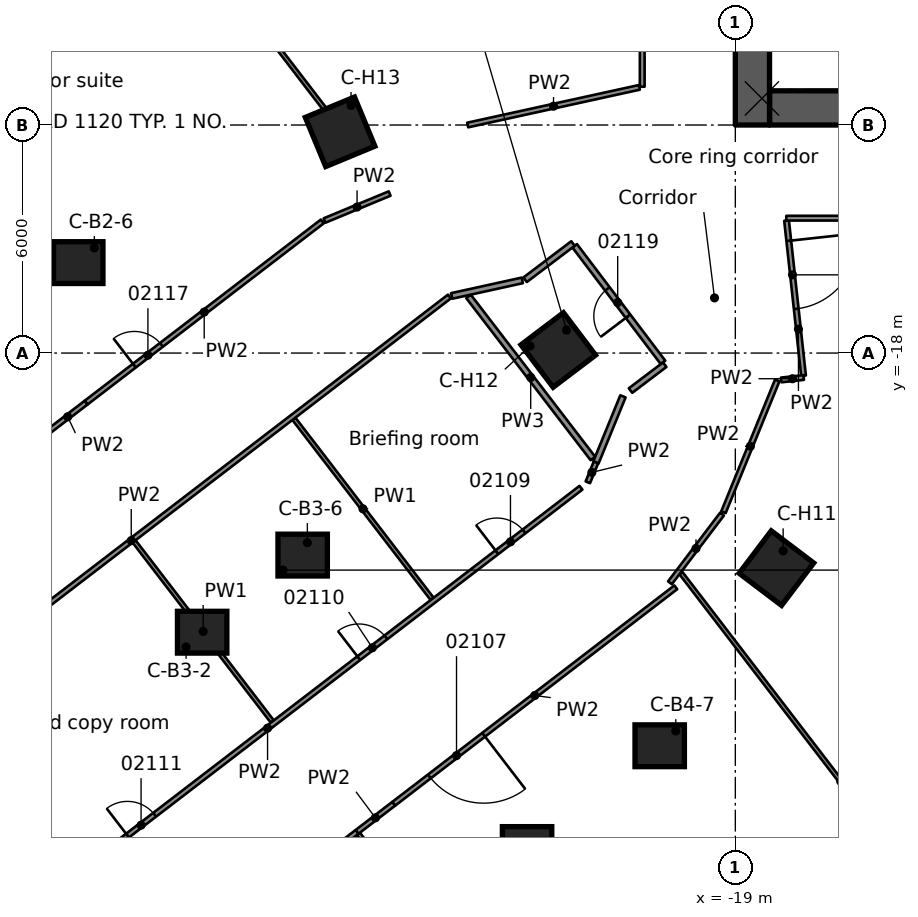
"""IFC4 building model, lengths in metres.
Left out: names, types, materials, properties, quantities, classifications, styles, units other than length and angle.
Written with IfcOpenShell. Run it as: python <this file> out.ifc"""

import sys

from ifc_helpers import new_model, si_unit, direction, frame, frame_2d, origin, origin_2d, place, context, subcontext, project, spatial, rectangle, extrude, element, fill, save


model = new_model("IFC4")
c1 = context("Model", 3, precision=1e-05, world=origin(), true_north=direction((0.0, 1.0)))
c2 = subcontext(c1, "Body", "Model", "MODEL_VIEW")
j1 = project(units=[si_unit("LENGTHUNIT", "METRE"), si_unit("PLANEANGLEUNIT", "RADIAN")], contexts=[c1])
p1 = place(None, origin())
s1 = spatial("IfcSite", under=j1, at=p1, CompositionType="ELEMENT")
p2 = place(p1, origin())
s2 = spatial("IfcBuilding", under=s1, at=p2, CompositionType="ELEMENT")
p3 = place(p2, frame((0.0, 0.0, 10.5)))
s3 = spatial("IfcBuildingStorey", under=s2, at=p3, CompositionType="ELEMENT", Elevation=10.5)
p4 = place(p3, frame((-18.1, -11.55, 0.0), z_axis=(0.0, 0.0, 1.0), x_axis=(1.0, 0.0, 0.0)))
e1 = element("IfcWall", 1, at=p4, inside=s3, PredefinedType="SHEAR", context=c2, shape_type="SweptSolid", body=[
    extrude(rectangle(XDim=9.2, YDim=0.9, at=frame_2d((4.6, 0.0))), origin(), (0.0, 0.0, 1.0), 5.0),
])
p5 = place(p4, frame((5.1, 0.0, 0.0)))
e2 = element("IfcOpeningElement", 2, at=p5, cuts=e1, PredefinedType="OPENING", context=c2, shape_type="SweptSolid", body=[
    extrude(rectangle(XDim=1.1, YDim=2.1, at=frame_2d((0.55, 1.05))), frame((0.0, 0.46, 0.0), z_axis=(0.0, -1.0, 0.0), x_axis=(1.0, 0.0, 0.0)), (0.0, 0.0, 1.0), 0.92),
])
p6 = place(p4, frame((7.53, 0.0, 0.0)))
e3 = element("IfcOpeningElement", 3, at=p6, cuts=e1, PredefinedType="OPENING", context=c2, shape_type="SweptSolid", body=[
    extrude(rectangle(XDim=0.9, YDim=2.1, at=frame_2d((0.45, 1.05))), frame((0.0, 0.46, 0.0), z_axis=(0.0, -1.0, 0.0), x_axis=(1.0, 0.0, 0.0)), (0.0, 0.0, 1.0), 0.92),
])
p7 = place(p3, frame((-18.55, -12.0, 0.0), z_axis=(0.0, 0.0, 1.0), x_axis=(0.0, 1.0, 0.0)))
e4 = element("IfcWall", 4, at=p7, inside=s3, PredefinedType="SHEAR", context=c2, shape_type="SweptSolid", body=[
    extrude(rectangle(XDim=24.0, YDim=0.9, at=frame_2d((12.0, 0.0))), origin(), (0.0, 0.0, 1.0), 5.0),
])
p8 = place(p7, frame((10.1, 0.0, 0.0)))
e5 = element("IfcOpeningElement", 5, at=p8, cuts=e4, PredefinedType="OPENING", context=c2, shape_type="SweptSolid", body=[
    extrude(rectangle(XDim=1.8, YDim=2.1, at=frame_2d((0.9, 1.05))), frame((0.0, 0.46, 0.0), z_axis=(0.0, -1.0, 0.0), x_axis=(1.0, 0.0, 0.0)), (0.0, 0.0, 1.0), 0.92),
])
p9 = place(p3, frame((-39.016, -8.771, -1.0), z_axis=(0.0, 0.0, 1.0), x_axis=(0.707106781187, 0.707106781187, 0.0)))
e6 = element("IfcColumn", 6, at=p9, inside=s3, PredefinedType="COLUMN", context=c2, shape_type="SweptSolid", body=[
    extrude(rectangle(XDim=3.4, YDim=3.4, at=origin_2d()), origin(), (0.0, 0.0, 1.0), 1.0),
])
for number, where, z_axis, x_axis in (
    (7, (-38.935, -17.649, -1.0), (0.0, 0.0, 1.0), (0.707, 0.707, 0.0)),
    (8, (-36.29, -15.62, -1.0), (0.0, 0.0, 1.0), (0.707, 0.707, 0.0)),
    (9, (-33.03, -25.345, -1.0), (0.0, 0.0, 1.0), (0.707, 0.707, 0.0)),
    (10, (-30.385, -23.316, -1.0), (0.0, 0.0, 1.0), (0.707, 0.707, 0.0)),
    (11, (-27.125, -33.04, -1.0), (0.0, 0.0, 1.0), (0.707, 0.707, 0.0)),
    (12, (-24.48, -31.011, -1.0), (0.0, 0.0, 1.0), (0.707, 0.707, 0.0)),
):
    element("IfcColumn", number, at=place(p3, frame(where, z_axis=z_axis, x_axis=x_axis)), inside=s3, PredefinedType="COLUMN", context=c2, shape_type="SweptSolid", body=[
        extrude(rectangle(XDim=3.25, YDim=3.25, at=origin_2d()), origin(), (0.0, 0.0, 1.0), 1.0),
    ])
for number, where, z_axis, x_axis in (
    (13, (-20.99, -28.333, -1.0), (0.0, 0.0, 1.0), (0.707, 0.707, 0.0)),
    (14, (-17.919, -23.659, -1.0), (0.0, 0.0, 1.0), (0.707, 0.707, 0.0)),
    (15, (-23.659, -17.919, -1.0), (0.0, 0.0, 1.0), (0.707, 0.707, 0.0)),
    (16, (-29.4, -12.178, -1.0), (0.0, 0.0, 1.0), (0.707, 0.707, 0.0)),
):
    element("IfcColumn", number, at=place(p3, frame(where, z_axis=z_axis, x_axis=x_axis)), inside=s3, PredefinedType="COLUMN", context=c2, shape_type="SweptSolid", body=[
        extrude(rectangle(XDim=3.4, YDim=3.4, at=origin_2d()), origin(), (0.0, 0.0, 1.0), 1.0),
    ])
for number, where, z_axis, x_axis in (
    (17, (-36.29, -15.62, 0.0), (0.0, 0.0, 1.0), (1.0, 0.0, 0.0)),
    (18, (-33.03, -25.345, 0.0), (0.0, 0.0, 1.0), (1.0, 0.0, 0.0)),
    (19, (-30.385, -23.316, 0.0), (0.0, 0.0, 1.0), (1.0, 0.0, 0.0)),
    (20, (-24.48, -31.011, 0.0), (0.0, 0.0, 1.0), (1.0, 0.0, 0.0)),
    (21, (-20.99, -28.333, 0.0), (0.0, 0.0, 1.0), (1.0, 0.0, 0.0)),
):
    element("IfcColumn", number, at=place(p3, frame(where, z_axis=z_axis, x_axis=x_axis)), inside=s3, PredefinedType="COLUMN", context=c2, shape_type="SweptSolid", body=[
        extrude(rectangle(XDim=1.3, YDim=1.1, at=origin_2d()), origin(), (0.0, 0.0, 1.0), 5.0),
    ])
for number, where, z_axis, x_axis in (
    (22, (-17.919, -23.659, 0.0), (0.0, 0.0, 1.0), (-0.604, -0.797, 0.0)),
    (23, (-23.659, -17.919, 0.0), (0.0, 0.0, 1.0), (-0.797, -0.604, 0.0)),
    (24, (-29.4, -12.178, 0.0), (0.0, 0.0, 1.0), (-0.924, -0.383, 0.0)),
):
    element("IfcColumn", number, at=place(p3, frame(where, z_axis=z_axis, x_axis=x_axis)), inside=s3, PredefinedType="COLUMN", context=c2, shape_type="SweptSolid", body=[
        extrude(rectangle(XDim=1.4, YDim=1.4, at=origin_2d()), origin(), (0.0, 0.0, 1.0), 5.0),
    ])
p10 = place(p3, frame((-17.652, -14.513, 0.0), z_axis=(0.0, 0.0, 1.0), x_axis=(0.108833050521, -0.994060042007, 0.0)))
e25 = element("IfcWall", 25, at=p10, inside=s3, PredefinedType="PARTITIONING", context=c2, shape_type="SweptSolid", body=[
    extrude(rectangle(XDim=4.107, YDim=0.125, at=frame_2d((2.054, 0.0))), origin(), (0.0, 0.0, 1.0), 4.58),
])
p11 = place(p10, frame((0.538, 0.0, 0.0)))
e26 = element("IfcOpeningElement", 26, at=p11, cuts=e25, PredefinedType="OPENING", context=c2, shape_type="SweptSolid", body=[
    extrude(rectangle(XDim=1.8, YDim=2.1, at=frame_2d((0.9, 1.05))), frame((0.0, 0.073, 0.0), z_axis=(0.0, -1.0, 0.0), x_axis=(1.0, 0.0, 0.0)), (0.0, 0.0, 1.0), 0.145),
])
p12 = place(p3, frame((-20.903, -18.246, 0.0), z_axis=(0.0, 0.0, 1.0), x_axis=(-0.603799066409, 0.797136555054, 0.0)))
e27 = element("IfcWall", 27, at=p12, inside=s3, PredefinedType="PARTITIONING", context=c2, shape_type="SweptSolid", body=[
    extrude(rectangle(XDim=3.849, YDim=0.15, at=frame_2d((1.924, 0.0))), origin(), (0.0, 0.0, 1.0), 4.58),
])
p13 = place(p12, frame((1.525, 0.0, 0.0)))
e28 = element("IfcOpeningElement", 28, at=p13, cuts=e27, PredefinedType="OPENING", context=c2, shape_type="SweptSolid", body=[
    extrude(rectangle(XDim=0.9, YDim=2.1, at=frame_2d((0.45, 1.05))), frame((0.0, 0.085, 0.0), z_axis=(0.0, -1.0, 0.0), x_axis=(1.0, 0.0, 0.0)), (0.0, 0.0, 1.0), 0.17),
])
p14 = place(p3, frame((-34.822, -22.955, 0.0), z_axis=(0.0, 0.0, 1.0), x_axis=(0.608823570319, -0.79330565372, 0.0)))
e29 = element("IfcWall", 29, at=p14, inside=s3, PredefinedType="PARTITIONING", context=c2, shape_type="SweptSolid", body=[
    extrude(rectangle(XDim=5.974, YDim=0.1, at=frame_2d((2.987, 0.0))), origin(), (0.0, 0.0, 1.0), 4.58),
])
p15 = place(p3, frame((-28.917, -30.652, 0.0), z_axis=(0.0, 0.0, 1.0), x_axis=(0.608788953199, -0.793332219478, 0.0)))
e30 = element("IfcWall", 30, at=p15, inside=s3, PredefinedType="PARTITIONING", context=c2, shape_type="SweptSolid", body=[
    extrude(rectangle(XDim=13.535, YDim=0.1, at=frame_2d((6.768, 0.0))), origin(), (0.0, 0.0, 1.0), 4.58),
])
p16 = place(p3, frame((-30.617, -19.729, 0.0), z_axis=(0.0, 0.0, 1.0), x_axis=(0.608902533452, -0.793245047104, 0.0)))
e31 = element("IfcWall", 31, at=p16, inside=s3, PredefinedType="PARTITIONING", context=c2, shape_type="SweptSolid", body=[
    extrude(rectangle(XDim=5.973, YDim=0.1, at=frame_2d((2.986, 0.0))), origin(), (0.0, 0.0, 1.0), 4.58),
])
p17 = place(p3, frame((-36.678, -2.619, 0.0), z_axis=(0.0, 0.0, 1.0), x_axis=(0.608769908396, -0.793346833757, 0.0)))
e32 = element("IfcWall", 32, at=p17, inside=s3, PredefinedType="PARTITIONING", context=c2, shape_type="SweptSolid", body=[
    extrude(rectangle(XDim=11.844, YDim=0.1, at=frame_2d((5.922, 0.0))), origin(), (0.0, 0.0, 1.0), 4.58),
])
p18 = place(p3, frame((-26.021, -16.509, 0.0), z_axis=(0.0, 0.0, 1.0), x_axis=(0.608806156611, -0.793319017592, 0.0)))
e33 = element("IfcWall", 33, at=p18, inside=s3, PredefinedType="PARTITIONING", context=c2, shape_type="SweptSolid", body=[
    extrude(rectangle(XDim=5.376, YDim=0.15, at=frame_2d((2.688, 0.0))), origin(), (0.0, 0.0, 1.0), 4.58),
])
p19 = place(p3, frame((-20.431, -23.791, 0.0), z_axis=(0.0, 0.0, 1.0), x_axis=(0.608708319694, -0.793394089678, 0.0)))
e34 = element("IfcWall", 34, at=p19, inside=s3, PredefinedType="PARTITIONING", context=c2, shape_type="SweptSolid", body=[
    extrude(rectangle(XDim=13.813, YDim=0.1, at=frame_2d((6.906, 0.0))), origin(), (0.0, 0.0, 1.0), 4.58),
])
p20 = place(p3, frame((-17.659, -14.451, 0.0), z_axis=(0.0, 0.0, 1.0), x_axis=(1.0, 0.0, 0.0)))
e35 = element("IfcWall", 35, at=p20, inside=s3, PredefinedType="PARTITIONING", context=c2, shape_type="SweptSolid", body=[
    extrude(rectangle(XDim=7.268, YDim=0.125, at=frame_2d((3.634, 0.0))), origin(), (0.0, 0.0, 1.0), 4.58),
])
p21 = place(p3, frame((-17.793, -18.708, 0.0), z_axis=(0.0, 0.0, 1.0), x_axis=(0.994037722998, 0.109036715182, 0.0)))
e36 = element("IfcWall", 36, at=p21, inside=s3, PredefinedType="PARTITIONING", context=c2, shape_type="SweptSolid", body=[
    extrude(rectangle(XDim=0.596, YDim=0.125, at=frame_2d((0.298, 0.0))), origin(), (0.0, 0.0, 1.0), 4.58),
])
p22 = place(p3, frame((-26.464, -16.497, 0.0), z_axis=(0.0, 0.0, 1.0), x_axis=(0.976601904513, 0.215055155954, 0.0)))
e37 = element("IfcWall", 37, at=p22, inside=s3, PredefinedType="PARTITIONING", context=c2, shape_type="SweptSolid", body=[
    extrude(rectangle(XDim=1.903, YDim=0.15, at=frame_2d((0.951, 0.0))), origin(), (0.0, 0.0, 1.0), 4.58),
])
p23 = place(p3, frame((-26.042, -12.0, 0.0), z_axis=(0.0, 0.0, 1.0), x_axis=(0.976761331961, 0.214329886822, 0.0)))
e38 = element("IfcWall", 38, at=p23, inside=s3, PredefinedType="PARTITIONING", context=c2, shape_type="SweptSolid", body=[
    extrude(rectangle(XDim=4.624, YDim=0.125, at=frame_2d((2.312, 0.0))), origin(), (0.0, 0.0, 1.0), 4.58),
])
p24 = place(p3, frame((-29.81, -14.513, 0.0), z_axis=(0.0, 0.0, 1.0), x_axis=(0.923811400228, 0.382847876851, 0.0)))
e39 = element("IfcWall", 39, at=p24, inside=s3, PredefinedType="PARTITIONING", context=c2, shape_type="SweptSolid", body=[
    extrude(rectangle(XDim=1.854, YDim=0.125, at=frame_2d((0.927, 0.0))), origin(), (0.0, 0.0, 1.0), 4.58),
])
p25 = place(p3, frame((-21.758, -18.987, 0.0), z_axis=(0.0, 0.0, 1.0), x_axis=(0.797423261737, 0.603420368931, 0.0)))
e40 = element("IfcWall", 40, at=p25, inside=s3, PredefinedType="PARTITIONING", context=c2, shape_type="SweptSolid", body=[
    extrude(rectangle(XDim=1.129, YDim=0.15, at=frame_2d((0.564, 0.0))), origin(), (0.0, 0.0, 1.0), 4.58),
])
p26 = place(p3, frame((-24.532, -16.072, 0.0), z_axis=(0.0, 0.0, 1.0), x_axis=(0.797229566058, 0.603676253469, 0.0)))
e41 = element("IfcWall", 41, at=p26, inside=s3, PredefinedType="PARTITIONING", context=c2, shape_type="SweptSolid", body=[
    extrude(rectangle(XDim=1.581, YDim=0.15, at=frame_2d((0.79, 0.0))), origin(), (0.0, 0.0, 1.0), 4.58),
])
p27 = place(p3, frame((-28.955, -30.6, 0.0), z_axis=(0.0, 0.0, 1.0), x_axis=(0.793590253862, 0.608452552772, 0.0)))
e42 = element("IfcWall", 42, at=p27, inside=s3, PredefinedType="PARTITIONING", context=c2, shape_type="SweptSolid", body=[
    extrude(rectangle(XDim=1.22, YDim=0.125, at=frame_2d((0.61, 0.0))), origin(), (0.0, 0.0, 1.0), 4.58),
])
p28 = place(p3, frame((-28.955, -30.6, 0.0), z_axis=(0.0, 0.0, 1.0), x_axis=(-0.793294727074, -0.608837807627, 0.0)))
e43 = element("IfcWall", 43, at=p28, inside=s3, PredefinedType="PARTITIONING", context=c2, shape_type="SweptSolid", body=[
    extrude(rectangle(XDim=13.9, YDim=0.125, at=frame_2d((6.95, 0.0))), origin(), (0.0, 0.0, 1.0), 4.58),
])
p29 = place(p28, frame((3.851, 0.0, 0.0)))
e44 = element("IfcOpeningElement", 44, at=p29, cuts=e43, PredefinedType="OPENING", context=c2, shape_type="SweptSolid", body=[
    extrude(rectangle(XDim=0.9, YDim=2.1, at=frame_2d((0.45, 1.05))), frame((0.0, 0.073, 0.0), z_axis=(0.0, -1.0, 0.0), x_axis=(1.0, 0.0, 0.0)), (0.0, 0.0, 1.0), 0.145),
])
p30 = place(p28, frame((10.801, 0.0, 0.0)))
e45 = element("IfcOpeningElement", 45, at=p30, cuts=e43, PredefinedType="OPENING", context=c2, shape_type="SweptSolid", body=[
    extrude(rectangle(XDim=0.9, YDim=2.1, at=frame_2d((0.45, 1.05))), frame((0.0, 0.073, 0.0), z_axis=(0.0, -1.0, 0.0), x_axis=(1.0, 0.0, 0.0)), (0.0, 0.0, 1.0), 0.145),
])
p31 = place(p3, frame((-20.567, -24.164, 0.0), z_axis=(0.0, 0.0, 1.0), x_axis=(-0.793345387212, -0.608771793523, 0.0)))
e46 = element("IfcWall", 46, at=p31, inside=s3, PredefinedType="PARTITIONING", context=c2, shape_type="SweptSolid", body=[
    extrude(rectangle(XDim=9.353, YDim=0.125, at=frame_2d((4.677, 0.0))), origin(), (0.0, 0.0, 1.0), 4.58),
])
p32 = place(p31, frame((6.373, 0.0, 0.0)))
e47 = element("IfcOpeningElement", 47, at=p32, cuts=e46, PredefinedType="OPENING", context=c2, shape_type="SweptSolid", body=[
    extrude(rectangle(XDim=1.8, YDim=2.1, at=frame_2d((0.9, 1.05))), frame((0.0, 0.073, 0.0), z_axis=(0.0, -1.0, 0.0), x_axis=(1.0, 0.0, 0.0)), (0.0, 0.0, 1.0), 0.145),
])
p33 = place(p3, frame((-39.556, -34.196, 0.0), z_axis=(0.0, 0.0, 1.0), x_axis=(0.793448872505, 0.608636908773, 0.0)))
e48 = element("IfcWall", 48, at=p33, inside=s3, PredefinedType="PARTITIONING", context=c2, shape_type="SweptSolid", body=[
    extrude(rectangle(XDim=20.788, YDim=0.125, at=frame_2d((10.394, 0.0))), origin(), (0.0, 0.0, 1.0), 4.58),
])
p34 = place(p33, frame((18.0, 0.0, 0.0)))
e49 = element("IfcOpeningElement", 49, at=p34, cuts=e48, PredefinedType="OPENING", context=c2, shape_type="SweptSolid", body=[
    extrude(rectangle(XDim=0.9, YDim=2.1, at=frame_2d((0.45, 1.05))), frame((0.0, 0.073, 0.0), z_axis=(0.0, -1.0, 0.0), x_axis=(1.0, 0.0, 0.0)), (0.0, 0.0, 1.0), 0.145),
])
p35 = place(p33, frame((13.419, 0.0, 0.0)))
e50 = element("IfcOpeningElement", 50, at=p35, cuts=e48, PredefinedType="OPENING", context=c2, shape_type="SweptSolid", body=[
    extrude(rectangle(XDim=0.9, YDim=2.1, at=frame_2d((0.45, 1.05))), frame((0.0, 0.073, 0.0), z_axis=(0.0, -1.0, 0.0), x_axis=(1.0, 0.0, 0.0)), (0.0, 0.0, 1.0), 0.145),
])
p36 = place(p33, frame((5.749, 0.0, 0.0)))
e51 = element("IfcOpeningElement", 51, at=p36, cuts=e48, PredefinedType="OPENING", context=c2, shape_type="SweptSolid", body=[
    extrude(rectangle(XDim=0.9, YDim=2.1, at=frame_2d((0.45, 1.05))), frame((0.0, 0.073, 0.0), z_axis=(0.0, -1.0, 0.0), x_axis=(1.0, 0.0, 0.0)), (0.0, 0.0, 1.0), 0.145),
])
p37 = place(p3, frame((-43.269, -29.358, 0.0), z_axis=(0.0, 0.0, 1.0), x_axis=(0.793439885471, 0.608648624531, 0.0)))
e52 = element("IfcWall", 52, at=p37, inside=s3, PredefinedType="PARTITIONING", context=c2, shape_type="SweptSolid", body=[
    extrude(rectangle(XDim=21.106, YDim=0.125, at=frame_2d((10.553, 0.0))), origin(), (0.0, 0.0, 1.0), 4.58),
])
p38 = place(p3, frame((-36.084, -19.305, 0.0), z_axis=(0.0, 0.0, 1.0), x_axis=(0.793472416576, 0.60860621434, 0.0)))
e53 = element("IfcWall", 53, at=p38, inside=s3, PredefinedType="PARTITIONING", context=c2, shape_type="SweptSolid", body=[
    extrude(rectangle(XDim=7.834, YDim=0.125, at=frame_2d((3.917, 0.0))), origin(), (0.0, 0.0, 1.0), 4.58),
])
p39 = place(p38, frame((1.6, 0.0, 0.0)))
e54 = element("IfcOpeningElement", 54, at=p39, cuts=e53, PredefinedType="OPENING", context=c2, shape_type="SweptSolid", body=[
    extrude(rectangle(XDim=0.9, YDim=2.1, at=frame_2d((0.45, 1.05))), frame((0.0, 0.073, 0.0), z_axis=(0.0, -1.0, 0.0), x_axis=(1.0, 0.0, 0.0)), (0.0, 0.0, 1.0), 0.145),
])
p40 = place(p3, frame((-37.051, -20.048, 0.0), z_axis=(0.0, 0.0, 1.0), x_axis=(0.792906683767, 0.60934308139, 0.0)))
e55 = element("IfcWall", 55, at=p40, inside=s3, PredefinedType="PARTITIONING", context=c2, shape_type="SweptSolid", body=[
    extrude(rectangle(XDim=1.22, YDim=0.125, at=frame_2d((0.61, 0.0))), origin(), (0.0, 0.0, 1.0), 4.58),
])
p41 = place(p3, frame((-19.35, -22.237, 0.0), z_axis=(0.0, 0.0, 1.0), x_axis=(-0.603936432713, -0.797032486943, 0.0)))
e56 = element("IfcWall", 56, at=p41, inside=s3, PredefinedType="PARTITIONING", context=c2, shape_type="SweptSolid", body=[
    extrude(rectangle(XDim=2.268, YDim=0.125, at=frame_2d((1.134, 0.0))), origin(), (0.0, 0.0, 1.0), 4.58),
])
p42 = place(p3, frame((-19.312, -22.187, 0.0), z_axis=(0.0, 0.0, 1.0), x_axis=(0.377878748859, 0.925855091881, 0.0)))
e57 = element("IfcWall", 57, at=p42, inside=s3, PredefinedType="PARTITIONING", context=c2, shape_type="SweptSolid", body=[
    extrude(rectangle(XDim=3.745, YDim=0.125, at=frame_2d((1.872, 0.0))), origin(), (0.0, 0.0, 1.0), 4.58),
])
p43 = place(p3, frame((-22.668, -20.878, 0.0), z_axis=(0.0, 0.0, 1.0), x_axis=(0.378415254767, 0.925635940832, 0.0)))
e58 = element("IfcWall", 58, at=p43, inside=s3, PredefinedType="PARTITIONING", context=c2, shape_type="SweptSolid", body=[
    extrude(rectangle(XDim=1.879, YDim=0.15, at=frame_2d((0.939, 0.0))), origin(), (0.0, 0.0, 1.0), 4.58),
])
p44 = place(p3, frame((-22.881, -21.401, 0.0), z_axis=(0.0, 0.0, 1.0), x_axis=(0.377420478288, 0.926041998275, 0.0)))
e59 = element("IfcWall", 59, at=p44, inside=s3, PredefinedType="PARTITIONING", context=c2, shape_type="SweptSolid", body=[
    extrude(rectangle(XDim=0.565, YDim=0.125, at=frame_2d((0.282, 0.0))), origin(), (0.0, 0.0, 1.0), 4.58),
])
p45 = place(p3, frame((-21.45, -10.992, 0.0), z_axis=(0.0, 0.0, 1.0), x_axis=(0.0, 1.0, 0.0)))
e60 = element("IfcWall", 60, at=p45, inside=s3, PredefinedType="PARTITIONING", context=c2, shape_type="SweptSolid", body=[
    extrude(rectangle(XDim=25.443, YDim=0.125, at=frame_2d((12.721, 0.0))), origin(), (0.0, 0.0, 1.0), 4.58),
])
p46 = place(p45, frame((4.85, 0.0, 0.0)))
e61 = element("IfcOpeningElement", 61, at=p46, cuts=e60, PredefinedType="OPENING", context=c2, shape_type="SweptSolid", body=[
    extrude(rectangle(XDim=1.8, YDim=2.1, at=frame_2d((0.9, 1.05))), frame((0.0, 0.073, 0.0), z_axis=(0.0, -1.0, 0.0), x_axis=(1.0, 0.0, 0.0)), (0.0, 0.0, 1.0), 0.145),
])
p47 = place(p45, frame((16.596, 0.0, 0.0)))
e62 = element("IfcOpeningElement", 62, at=p47, cuts=e60, PredefinedType="OPENING", context=c2, shape_type="SweptSolid", body=[
    extrude(rectangle(XDim=1.1, YDim=2.1, at=frame_2d((0.55, 1.05))), frame((0.0, 0.073, 0.0), z_axis=(0.0, -1.0, 0.0), x_axis=(1.0, 0.0, 0.0)), (0.0, 0.0, 1.0), 0.145),
])
p48 = place(p32, origin())
e63 = element("IfcDoor", 63, at=p48, inside=s3, OperationType="DOUBLE_DOOR_SINGLE_SWING", PredefinedType="DOOR", context=c2, shape_type="SweptSolid", body=[
    extrude(rectangle(XDim=1.8, YDim=2.1, at=frame_2d((0.9, 1.05))), frame((0.0, 0.025, 0.0), z_axis=(0.0, -1.0, 0.0), x_axis=(1.0, 0.0, 0.0)), (0.0, 0.0, 1.0), 0.05),
])
fill(e47, e63)
p49 = place(p34, origin())
e64 = element("IfcDoor", 64, at=p49, inside=s3, OperationType="SINGLE_SWING_RIGHT", PredefinedType="DOOR", context=c2, shape_type="SweptSolid", body=[
    extrude(rectangle(XDim=0.9, YDim=2.1, at=frame_2d((0.45, 1.05))), frame((0.0, 0.025, 0.0), z_axis=(0.0, -1.0, 0.0), x_axis=(1.0, 0.0, 0.0)), (0.0, 0.0, 1.0), 0.05),
])
fill(e49, e64)
p50 = place(p35, origin())
e65 = element("IfcDoor", 65, at=p50, inside=s3, OperationType="SINGLE_SWING_RIGHT", PredefinedType="DOOR", context=c2, shape_type="SweptSolid", body=[
    extrude(rectangle(XDim=0.9, YDim=2.1, at=frame_2d((0.45, 1.05))), frame((0.0, 0.025, 0.0), z_axis=(0.0, -1.0, 0.0), x_axis=(1.0, 0.0, 0.0)), (0.0, 0.0, 1.0), 0.05),
])
fill(e50, e65)
p51 = place(p36, origin())
e66 = element("IfcDoor", 66, at=p51, inside=s3, OperationType="SINGLE_SWING_LEFT", PredefinedType="DOOR", context=c2, shape_type="SweptSolid", body=[
    extrude(rectangle(XDim=0.9, YDim=2.1, at=frame_2d((0.45, 1.05))), frame((0.0, 0.025, 0.0), z_axis=(0.0, -1.0, 0.0), x_axis=(1.0, 0.0, 0.0)), (0.0, 0.0, 1.0), 0.05),
])
fill(e51, e66)
p52 = place(p39, origin())
e67 = element("IfcDoor", 67, at=p52, inside=s3, OperationType="SINGLE_SWING_LEFT", PredefinedType="DOOR", context=c2, shape_type="SweptSolid", body=[
    extrude(rectangle(XDim=0.9, YDim=2.1, at=frame_2d((0.45, 1.05))), frame((0.0, 0.025, 0.0), z_axis=(0.0, -1.0, 0.0), x_axis=(1.0, 0.0, 0.0)), (0.0, 0.0, 1.0), 0.05),
])
fill(e54, e67)
p53 = place(p13, origin())
e68 = element("IfcDoor", 68, at=p53, inside=s3, OperationType="SINGLE_SWING_RIGHT", PredefinedType="DOOR", context=c2, shape_type="SweptSolid", body=[
    extrude(rectangle(XDim=0.9, YDim=2.1, at=frame_2d((0.45, 1.05))), frame((0.0, 0.025, 0.0), z_axis=(0.0, -1.0, 0.0), x_axis=(1.0, 0.0, 0.0)), (0.0, 0.0, 1.0), 0.05),
])
fill(e28, e68)
p54 = place(p11, origin())
e69 = element("IfcDoor", 69, at=p54, inside=s3, OperationType="DOUBLE_DOOR_SINGLE_SWING", PredefinedType="DOOR", context=c2, shape_type="SweptSolid", body=[
    extrude(rectangle(XDim=1.8, YDim=2.1, at=frame_2d((0.9, 1.05))), frame((0.0, 0.025, 0.0), z_axis=(0.0, -1.0, 0.0), x_axis=(1.0, 0.0, 0.0)), (0.0, 0.0, 1.0), 0.05),
])
fill(e26, e69)
save(model, sys.argv[1])
